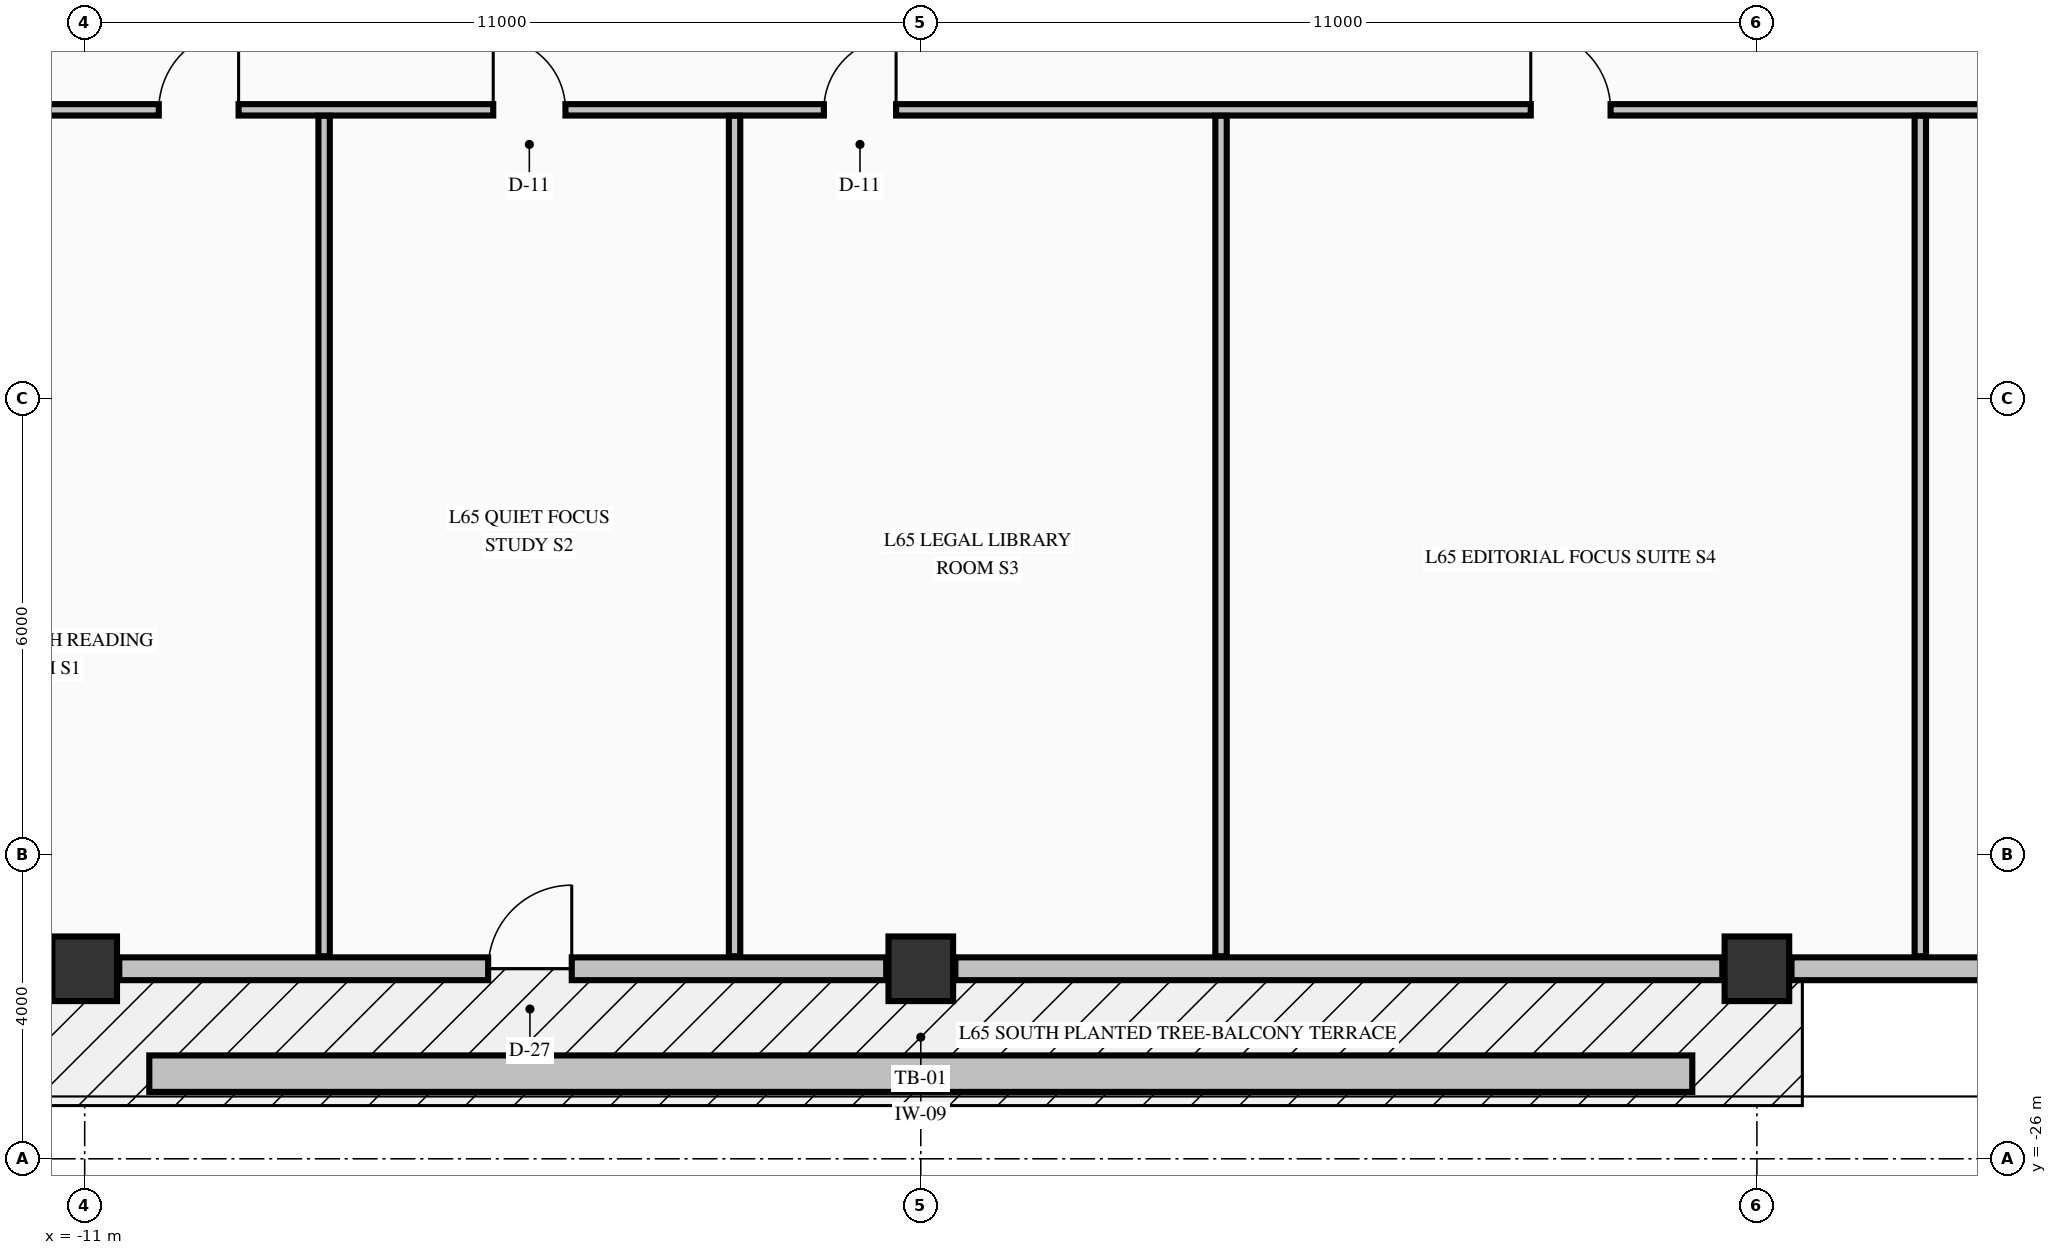
"""IFC4 building model, lengths in metres.
Left out: names, types, materials, properties, quantities, classifications, styles, units other than length and angle.
Written with IfcOpenShell. Run it as: python <this file> out.ifc"""

import sys

from ifc_helpers import new_model, si_unit, direction, frame, frame_2d, origin, origin_2d, place, context, subcontext, project, spatial, rectangle, extrude, element, fill, save


model = new_model("IFC4")
c1 = context("Model", 3, precision=1e-05, world=origin(), true_north=direction((0.0, 1.0)))
c2 = subcontext(c1, "Body", "Model", "MODEL_VIEW")
j1 = project(units=[si_unit("LENGTHUNIT", "METRE"), si_unit("PLANEANGLEUNIT", "RADIAN")], contexts=[c1])
p1 = place(None, origin())
s1 = spatial("IfcSite", under=j1, at=p1, CompositionType="ELEMENT")
p2 = place(p1, origin())
s2 = spatial("IfcBuilding", under=s1, at=p2, CompositionType="ELEMENT")
p3 = place(p2, frame((0.0, 0.0, 246.2)))
s3 = spatial("IfcBuildingStorey", under=s2, at=p3, CompositionType="ELEMENT", Elevation=246.2)
for number, where, z_axis, x_axis in (
    (1, (-11.0, -23.5, -0.25), (0.0, 0.0, 1.0), (1.0, 0.0, 0.0)),
    (2, (0.0, -23.5, -0.25), (0.0, 0.0, 1.0), (1.0, 0.0, 0.0)),
    (3, (11.0, -23.5, -0.25), (0.0, 0.0, 1.0), (1.0, 0.0, 0.0)),
):
    element("IfcColumn", number, at=place(p3, frame(where, z_axis=z_axis, x_axis=x_axis)), inside=s3, PredefinedType="COLUMN", context=c2, shape_type="SweptSolid", body=[
        extrude(rectangle(XDim=0.85, YDim=0.85, at=origin_2d()), origin(), (0.0, 0.0, 1.0), 3.055),
    ])
p4 = place(p3, frame((-10.545, -23.5, 0.0), z_axis=(0.0, 0.0, 1.0), x_axis=(1.0, 0.0, 0.0)))
e4 = element("IfcWall", 4, at=p4, inside=s3, PredefinedType="STANDARD", context=c2, shape_type="SweptSolid", body=[
    extrude(rectangle(XDim=10.09, YDim=0.3, at=frame_2d((5.045, 0.0))), origin(), (0.0, 0.0, 1.0), 2.197),
])
p5 = place(p4, frame((4.853, 0.0, 0.0)))
e5 = element("IfcOpeningElement", 5, at=p5, cuts=e4, PredefinedType="OPENING", context=c2, shape_type="SweptSolid", body=[
    extrude(rectangle(XDim=1.1, YDim=2.05, at=frame_2d((0.55, 1.025))), frame((0.0, 0.16, 0.0), z_axis=(0.0, -1.0, 0.0), x_axis=(1.0, 0.0, 0.0)), (0.0, 0.0, 1.0), 0.32),
])
p6 = place(p3, frame((0.455, -23.5, 0.0), z_axis=(0.0, 0.0, 1.0), x_axis=(1.0, 0.0, 0.0)))
e6 = element("IfcWall", 6, at=p6, inside=s3, PredefinedType="STANDARD", context=c2, shape_type="SweptSolid", body=[
    extrude(rectangle(XDim=10.09, YDim=0.3, at=frame_2d((5.045, 0.0))), origin(), (0.0, 0.0, 1.0), 2.197),
])
p7 = place(p3, frame((11.455, -23.5, 0.0), z_axis=(0.0, 0.0, 1.0), x_axis=(1.0, 0.0, 0.0)))
e7 = element("IfcWall", 7, at=p7, inside=s3, PredefinedType="STANDARD", context=c2, shape_type="SweptSolid", body=[
    extrude(rectangle(XDim=8.59, YDim=0.3, at=frame_2d((4.295, 0.0))), origin(), (0.0, 0.0, 1.0), 2.197),
])
p8 = place(p3, frame((-20.075, -12.2, 0.0), z_axis=(0.0, 0.0, 1.0), x_axis=(1.0, 0.0, 0.0)))
e8 = element("IfcWall", 8, at=p8, inside=s3, PredefinedType="PARTITIONING", context=c2, shape_type="SweptSolid", body=[
    extrude(rectangle(XDim=45.91, YDim=0.15, at=frame_2d((22.955, 0.0))), origin(), (0.0, 0.0, 1.0), 2.805),
])
p9 = place(p8, frame((10.05, 0.0, 0.0)))
e9 = element("IfcOpeningElement", 9, at=p9, cuts=e8, PredefinedType="OPENING", context=c2, shape_type="SweptSolid", body=[
    extrude(rectangle(XDim=1.05, YDim=2.15, at=frame_2d((0.525, 1.075))), frame((0.0, 0.085, 0.0), z_axis=(0.0, -1.0, 0.0), x_axis=(1.0, 0.0, 0.0)), (0.0, 0.0, 1.0), 0.17),
])
p10 = place(p8, frame((14.45, 0.0, 0.0)))
e10 = element("IfcOpeningElement", 10, at=p10, cuts=e8, PredefinedType="OPENING", context=c2, shape_type="SweptSolid", body=[
    extrude(rectangle(XDim=0.95, YDim=2.15, at=frame_2d((0.475, 1.075))), frame((0.0, 0.085, 0.0), z_axis=(0.0, -1.0, 0.0), x_axis=(1.0, 0.0, 0.0)), (0.0, 0.0, 1.0), 0.17),
])
p11 = place(p8, frame((18.8, 0.0, 0.0)))
e11 = element("IfcOpeningElement", 11, at=p11, cuts=e8, PredefinedType="OPENING", context=c2, shape_type="SweptSolid", body=[
    extrude(rectangle(XDim=0.95, YDim=2.15, at=frame_2d((0.475, 1.075))), frame((0.0, 0.085, 0.0), z_axis=(0.0, -1.0, 0.0), x_axis=(1.0, 0.0, 0.0)), (0.0, 0.0, 1.0), 0.17),
])
p12 = place(p8, frame((28.1, 0.0, 0.0)))
e12 = element("IfcOpeningElement", 12, at=p12, cuts=e8, PredefinedType="OPENING", context=c2, shape_type="SweptSolid", body=[
    extrude(rectangle(XDim=1.05, YDim=2.15, at=frame_2d((0.525, 1.075))), frame((0.0, 0.085, 0.0), z_axis=(0.0, -1.0, 0.0), x_axis=(1.0, 0.0, 0.0)), (0.0, 0.0, 1.0), 0.17),
])
p13 = place(p8, frame((36.08, 0.0, 0.0)))
e13 = element("IfcOpeningElement", 13, at=p13, cuts=e8, PredefinedType="OPENING", context=c2, shape_type="SweptSolid", body=[
    extrude(rectangle(XDim=0.95, YDim=2.15, at=frame_2d((0.475, 1.075))), frame((0.0, 0.085, 0.0), z_axis=(0.0, -1.0, 0.0), x_axis=(1.0, 0.0, 0.0)), (0.0, 0.0, 1.0), 0.17),
])
for number, where, z_axis, x_axis in (
    (14, (-7.85, -23.335, 0.0), (0.0, 0.0, 1.0), (0.0, 1.0, 0.0)),
    (15, (-2.45, -23.335, 0.0), (0.0, 0.0, 1.0), (0.0, 1.0, 0.0)),
    (16, (3.95, -23.335, 0.0), (0.0, 0.0, 1.0), (0.0, 1.0, 0.0)),
    (17, (13.15, -23.335, 0.0), (0.0, 0.0, 1.0), (0.0, 1.0, 0.0)),
):
    element("IfcWall", number, at=place(p3, frame(where, z_axis=z_axis, x_axis=x_axis)), inside=s3, PredefinedType="PARTITIONING", context=c2, shape_type="SweptSolid", body=[
        extrude(rectangle(XDim=11.057, YDim=0.15, at=frame_2d((5.528, 0.0))), origin(), (0.0, 0.0, 1.0), 2.805),
    ])
p14 = place(p3, frame((-10.15, -24.88, -0.04), z_axis=(0.0, 0.0, 1.0), x_axis=(1.0, 0.0, 0.0)))
e18 = element("IfcWall", 18, at=p14, inside=s3, PredefinedType="PARAPET", context=c2, shape_type="SweptSolid", body=[
    extrude(rectangle(XDim=20.3, YDim=0.48, at=frame_2d((10.15, 0.0))), origin(), (0.0, 0.0, 1.0), 0.52),
])
p15 = place(p5, origin())
e19 = element("IfcDoor", 19, at=p15, inside=s3, OperationType="SINGLE_SWING_RIGHT", PredefinedType="DOOR", context=c2, shape_type="SweptSolid", body=[
    extrude(rectangle(XDim=1.1, YDim=2.05, at=frame_2d((0.55, 1.025))), frame((0.0, 0.025, 0.0), z_axis=(0.0, -1.0, 0.0), x_axis=(1.0, 0.0, 0.0)), (0.0, 0.0, 1.0), 0.05),
])
fill(e5, e19)
p16 = place(p9, origin())
e20 = element("IfcDoor", 20, at=p16, inside=s3, OperationType="SINGLE_SWING_RIGHT", PredefinedType="DOOR", context=c2, shape_type="SweptSolid", body=[
    extrude(rectangle(XDim=1.05, YDim=2.15, at=frame_2d((0.525, 1.075))), frame((0.0, 0.025, 0.0), z_axis=(0.0, -1.0, 0.0), x_axis=(1.0, 0.0, 0.0)), (0.0, 0.0, 1.0), 0.05),
])
fill(e9, e20)
p17 = place(p10, origin())
e21 = element("IfcDoor", 21, at=p17, inside=s3, OperationType="SINGLE_SWING_LEFT", PredefinedType="DOOR", context=c2, shape_type="SweptSolid", body=[
    extrude(rectangle(XDim=0.95, YDim=2.15, at=frame_2d((0.475, 1.075))), frame((0.0, 0.025, 0.0), z_axis=(0.0, -1.0, 0.0), x_axis=(1.0, 0.0, 0.0)), (0.0, 0.0, 1.0), 0.05),
])
fill(e10, e21)
p18 = place(p11, origin())
e22 = element("IfcDoor", 22, at=p18, inside=s3, OperationType="SINGLE_SWING_RIGHT", PredefinedType="DOOR", context=c2, shape_type="SweptSolid", body=[
    extrude(rectangle(XDim=0.95, YDim=2.15, at=frame_2d((0.475, 1.075))), frame((0.0, 0.025, 0.0), z_axis=(0.0, -1.0, 0.0), x_axis=(1.0, 0.0, 0.0)), (0.0, 0.0, 1.0), 0.05),
])
fill(e11, e22)
p19 = place(p12, origin())
e23 = element("IfcDoor", 23, at=p19, inside=s3, OperationType="SINGLE_SWING_LEFT", PredefinedType="DOOR", context=c2, shape_type="SweptSolid", body=[
    extrude(rectangle(XDim=1.05, YDim=2.15, at=frame_2d((0.525, 1.075))), frame((0.0, 0.025, 0.0), z_axis=(0.0, -1.0, 0.0), x_axis=(1.0, 0.0, 0.0)), (0.0, 0.0, 1.0), 0.05),
])
fill(e12, e23)
save(model, sys.argv[1])
